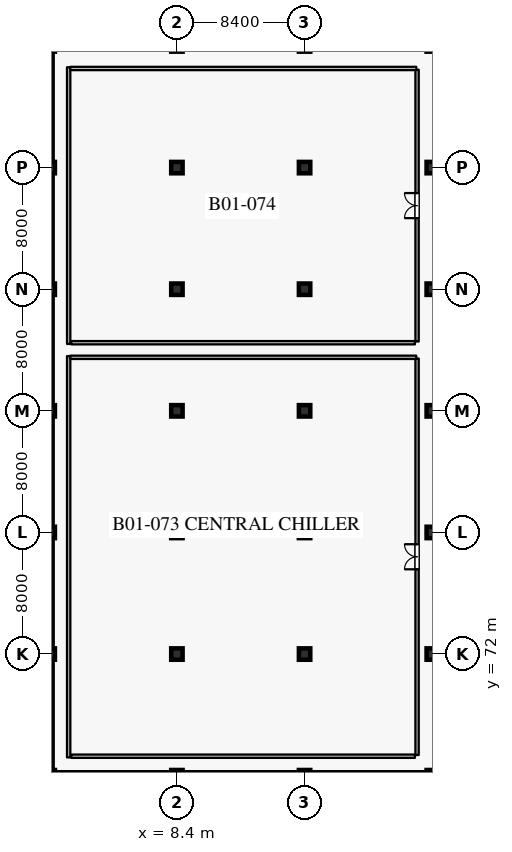
"""IFC4 building model, lengths in metres.
Left out: names, types, materials, properties, quantities, classifications, styles, units other than length and angle.
Written with IfcOpenShell. Run it as: python <this file> out.ifc"""

import sys

from ifc_helpers import new_model, si_unit, direction, frame, frame_2d, origin, origin_2d, place, context, subcontext, project, spatial, rectangle, extrude, element, fill, save


model = new_model("IFC4")
c1 = context("Model", 3, precision=1e-05, world=origin(), true_north=direction((0.0, 1.0)))
c2 = subcontext(c1, "Body", "Model", "MODEL_VIEW")
j1 = project(units=[si_unit("LENGTHUNIT", "METRE"), si_unit("PLANEANGLEUNIT", "RADIAN")], contexts=[c1])
p1 = place(None, origin())
s1 = spatial("IfcSite", under=j1, at=p1, CompositionType="ELEMENT")
p2 = place(p1, origin())
s2 = spatial("IfcBuilding", under=s1, at=p2, CompositionType="ELEMENT")
p3 = place(p2, frame((0.0, 0.0, -5.4)))
s3 = spatial("IfcBuildingStorey", under=s2, at=p3, CompositionType="ELEMENT", Elevation=-5.4)
for number, where, z_axis, x_axis in (
    (1, (0.0, 64.0, 0.0), (0.0, 0.0, 1.0), (1.0, 0.0, 0.0)),
    (2, (0.0, 72.0, 0.0), (0.0, 0.0, 1.0), (1.0, 0.0, 0.0)),
    (3, (0.0, 80.0, 0.0), (0.0, 0.0, 1.0), (1.0, 0.0, 0.0)),
    (4, (0.0, 88.0, 0.0), (0.0, 0.0, 1.0), (1.0, 0.0, 0.0)),
    (5, (0.0, 96.0, 0.0), (0.0, 0.0, 1.0), (1.0, 0.0, 0.0)),
    (6, (0.0, 104.0, 0.0), (0.0, 0.0, 1.0), (1.0, 0.0, 0.0)),
    (7, (8.4, 64.0, 0.0), (0.0, 0.0, 1.0), (1.0, 0.0, 0.0)),
    (8, (8.4, 72.0, 0.0), (0.0, 0.0, 1.0), (1.0, 0.0, 0.0)),
    (9, (8.4, 80.0, 0.0), (0.0, 0.0, 1.0), (1.0, 0.0, 0.0)),
    (10, (8.4, 88.0, 0.0), (0.0, 0.0, 1.0), (1.0, 0.0, 0.0)),
    (11, (8.4, 96.0, 0.0), (0.0, 0.0, 1.0), (1.0, 0.0, 0.0)),
    (12, (8.4, 104.0, 0.0), (0.0, 0.0, 1.0), (1.0, 0.0, 0.0)),
    (13, (16.8, 64.0, 0.0), (0.0, 0.0, 1.0), (1.0, 0.0, 0.0)),
    (14, (16.8, 72.0, 0.0), (0.0, 0.0, 1.0), (1.0, 0.0, 0.0)),
    (15, (16.8, 80.0, 0.0), (0.0, 0.0, 1.0), (1.0, 0.0, 0.0)),
    (16, (16.8, 88.0, 0.0), (0.0, 0.0, 1.0), (1.0, 0.0, 0.0)),
    (17, (16.8, 96.0, 0.0), (0.0, 0.0, 1.0), (1.0, 0.0, 0.0)),
    (18, (16.8, 104.0, 0.0), (0.0, 0.0, 1.0), (1.0, 0.0, 0.0)),
    (19, (25.2, 64.0, 0.0), (0.0, 0.0, 1.0), (1.0, 0.0, 0.0)),
    (20, (25.2, 72.0, 0.0), (0.0, 0.0, 1.0), (1.0, 0.0, 0.0)),
    (21, (25.2, 80.0, 0.0), (0.0, 0.0, 1.0), (1.0, 0.0, 0.0)),
    (22, (25.2, 88.0, 0.0), (0.0, 0.0, 1.0), (1.0, 0.0, 0.0)),
    (23, (25.2, 96.0, 0.0), (0.0, 0.0, 1.0), (1.0, 0.0, 0.0)),
    (24, (25.2, 104.0, 0.0), (0.0, 0.0, 1.0), (1.0, 0.0, 0.0)),
):
    element("IfcColumn", number, at=place(p3, frame(where, z_axis=z_axis, x_axis=x_axis)), inside=s3, PredefinedType="COLUMN", context=c2, shape_type="SweptSolid", body=[
        extrude(rectangle(XDim=0.75, YDim=0.75, at=origin_2d()), origin(), (0.0, 0.0, 1.0), 5.4),
    ])
p4 = place(p3, frame((24.825, 64.0, 0.0), z_axis=(0.0, 0.0, 1.0), x_axis=(-1.0, 0.0, 0.0)))
e25 = element("IfcWall", 25, at=p4, inside=s3, PredefinedType="USERDEFINED", context=c2, shape_type="SweptSolid", body=[
    extrude(rectangle(XDim=7.65, YDim=0.45, at=frame_2d((3.825, 0.0))), origin(), (0.0, 0.0, 1.0), 4.3),
])
p5 = place(p3, frame((16.425, 64.0, 0.0), z_axis=(0.0, 0.0, 1.0), x_axis=(-1.0, 0.0, 0.0)))
e26 = element("IfcWall", 26, at=p5, inside=s3, PredefinedType="USERDEFINED", context=c2, shape_type="SweptSolid", body=[
    extrude(rectangle(XDim=7.65, YDim=0.45, at=frame_2d((3.825, 0.0))), origin(), (0.0, 0.0, 1.0), 4.3),
])
p6 = place(p3, frame((8.025, 64.0, 0.0), z_axis=(0.0, 0.0, 1.0), x_axis=(-1.0, 0.0, 0.0)))
e27 = element("IfcWall", 27, at=p6, inside=s3, PredefinedType="USERDEFINED", context=c2, shape_type="SweptSolid", body=[
    extrude(rectangle(XDim=7.65, YDim=0.45, at=frame_2d((3.825, 0.0))), origin(), (0.0, 0.0, 1.0), 4.3),
])
for number, where, z_axis, x_axis in (
    (28, (0.0, 64.375, 0.0), (0.0, 0.0, 1.0), (0.0, 1.0, 0.0)),
    (29, (0.0, 72.375, 0.0), (0.0, 0.0, 1.0), (0.0, 1.0, 0.0)),
    (30, (0.0, 80.375, 0.0), (0.0, 0.0, 1.0), (0.0, 1.0, 0.0)),
    (31, (0.0, 88.375, 0.0), (0.0, 0.0, 1.0), (0.0, 1.0, 0.0)),
    (32, (0.0, 96.375, 0.0), (0.0, 0.0, 1.0), (0.0, 1.0, 0.0)),
    (33, (0.0, 104.375, 0.0), (0.0, 0.0, 1.0), (0.0, 1.0, 0.0)),
):
    element("IfcWall", number, at=place(p3, frame(where, z_axis=z_axis, x_axis=x_axis)), inside=s3, PredefinedType="USERDEFINED", context=c2, shape_type="SweptSolid", body=[
        extrude(rectangle(XDim=7.25, YDim=0.45, at=frame_2d((3.625, 0.0))), origin(), (0.0, 0.0, 1.0), 4.3),
    ])
p7 = place(p3, frame((24.2, 65.36, 0.0), z_axis=(0.0, 0.0, 1.0), x_axis=(0.0, 1.0, 0.0)))
e34 = element("IfcWall", 34, at=p7, inside=s3, PredefinedType="PARTITIONING", context=c2, shape_type="SweptSolid", body=[
    extrude(rectangle(XDim=26.08, YDim=0.22, at=frame_2d((13.04, 0.0))), origin(), (0.0, 0.0, 1.0), 4.995),
])
p8 = place(p7, frame((12.215, 0.0, 0.0)))
e35 = element("IfcOpeningElement", 35, at=p8, cuts=e34, PredefinedType="OPENING", context=c2, shape_type="SweptSolid", body=[
    extrude(rectangle(XDim=1.65, YDim=2.4, at=frame_2d((0.825, 1.2))), frame((0.0, 0.12, 0.0), z_axis=(0.0, -1.0, 0.0), x_axis=(1.0, 0.0, 0.0)), (0.0, 0.0, 1.0), 0.24),
])
p9 = place(p3, frame((1.45, 65.28, 0.0), z_axis=(0.0, 0.0, 1.0), x_axis=(1.0, 0.0, 0.0)))
e36 = element("IfcWall", 36, at=p9, inside=s3, PredefinedType="PARTITIONING", context=c2, shape_type="SweptSolid", body=[
    extrude(rectangle(XDim=22.61, YDim=0.22, at=frame_2d((11.305, 0.0))), origin(), (0.0, 0.0, 1.0), 4.995),
])
p10 = place(p3, frame((24.2, 92.56, 0.0), z_axis=(0.0, 0.0, 1.0), x_axis=(0.0, 1.0, 0.0)))
e37 = element("IfcWall", 37, at=p10, inside=s3, PredefinedType="PARTITIONING", context=c2, shape_type="SweptSolid", body=[
    extrude(rectangle(XDim=17.88, YDim=0.22, at=frame_2d((8.94, 0.0))), origin(), (0.0, 0.0, 1.0), 4.995),
])
p11 = place(p10, frame((8.115, 0.0, 0.0)))
e38 = element("IfcOpeningElement", 38, at=p11, cuts=e37, PredefinedType="OPENING", context=c2, shape_type="SweptSolid", body=[
    extrude(rectangle(XDim=1.65, YDim=2.4, at=frame_2d((0.825, 1.2))), frame((0.0, 0.12, 0.0), z_axis=(0.0, -1.0, 0.0), x_axis=(1.0, 0.0, 0.0)), (0.0, 0.0, 1.0), 0.24),
])
p12 = place(p3, frame((1.45, 92.48, 0.0), z_axis=(0.0, 0.0, 1.0), x_axis=(1.0, 0.0, 0.0)))
e39 = element("IfcWall", 39, at=p12, inside=s3, PredefinedType="PARTITIONING", context=c2, shape_type="SweptSolid", body=[
    extrude(rectangle(XDim=22.61, YDim=0.22, at=frame_2d((11.305, 0.0))), origin(), (0.0, 0.0, 1.0), 4.995),
])
p13 = place(p3, frame((1.28, 65.2, 0.0), z_axis=(0.0, 0.0, 1.0), x_axis=(0.0, 1.0, 0.0)))
e40 = element("IfcWall", 40, at=p13, inside=s3, PredefinedType="PARTITIONING", context=c2, shape_type="SweptSolid", body=[
    extrude(rectangle(XDim=26.4, YDim=0.22, at=frame_2d((13.2, 0.0))), origin(), (0.0, 0.0, 1.0), 4.995),
])
p14 = place(p3, frame((1.39, 91.52, 0.0), z_axis=(0.0, 0.0, 1.0), x_axis=(1.0, 0.0, 0.0)))
e41 = element("IfcWall", 41, at=p14, inside=s3, PredefinedType="PARTITIONING", context=c2, shape_type="SweptSolid", body=[
    extrude(rectangle(XDim=22.758, YDim=0.22, at=frame_2d((11.379, 0.0))), origin(), (0.0, 0.0, 1.0), 4.995),
])
p15 = place(p3, frame((1.28, 92.4, 0.0), z_axis=(0.0, 0.0, 1.0), x_axis=(0.0, 1.0, 0.0)))
e42 = element("IfcWall", 42, at=p15, inside=s3, PredefinedType="PARTITIONING", context=c2, shape_type="SweptSolid", body=[
    extrude(rectangle(XDim=18.2, YDim=0.22, at=frame_2d((9.1, 0.0))), origin(), (0.0, 0.0, 1.0), 4.995),
])
p16 = place(p3, frame((1.39, 110.52, 0.0), z_axis=(0.0, 0.0, 1.0), x_axis=(1.0, 0.0, 0.0)))
e43 = element("IfcWall", 43, at=p16, inside=s3, PredefinedType="PARTITIONING", context=c2, shape_type="SweptSolid", body=[
    extrude(rectangle(XDim=22.758, YDim=0.22, at=frame_2d((11.379, 0.0))), origin(), (0.0, 0.0, 1.0), 4.995),
])
p17 = place(p8, origin())
e44 = element("IfcDoor", 44, at=p17, inside=s3, OperationType="DOUBLE_DOOR_SINGLE_SWING", PredefinedType="DOOR", context=c2, shape_type="SweptSolid", body=[
    extrude(rectangle(XDim=1.65, YDim=2.4, at=frame_2d((0.825, 1.2))), frame((0.0, 0.025, 0.0), z_axis=(0.0, -1.0, 0.0), x_axis=(1.0, 0.0, 0.0)), (0.0, 0.0, 1.0), 0.05),
])
fill(e35, e44)
p18 = place(p11, origin())
e45 = element("IfcDoor", 45, at=p18, inside=s3, OperationType="DOUBLE_DOOR_SINGLE_SWING", PredefinedType="DOOR", context=c2, shape_type="SweptSolid", body=[
    extrude(rectangle(XDim=1.65, YDim=2.4, at=frame_2d((0.825, 1.2))), frame((0.0, 0.025, 0.0), z_axis=(0.0, -1.0, 0.0), x_axis=(1.0, 0.0, 0.0)), (0.0, 0.0, 1.0), 0.05),
])
fill(e38, e45)
save(model, sys.argv[1])
